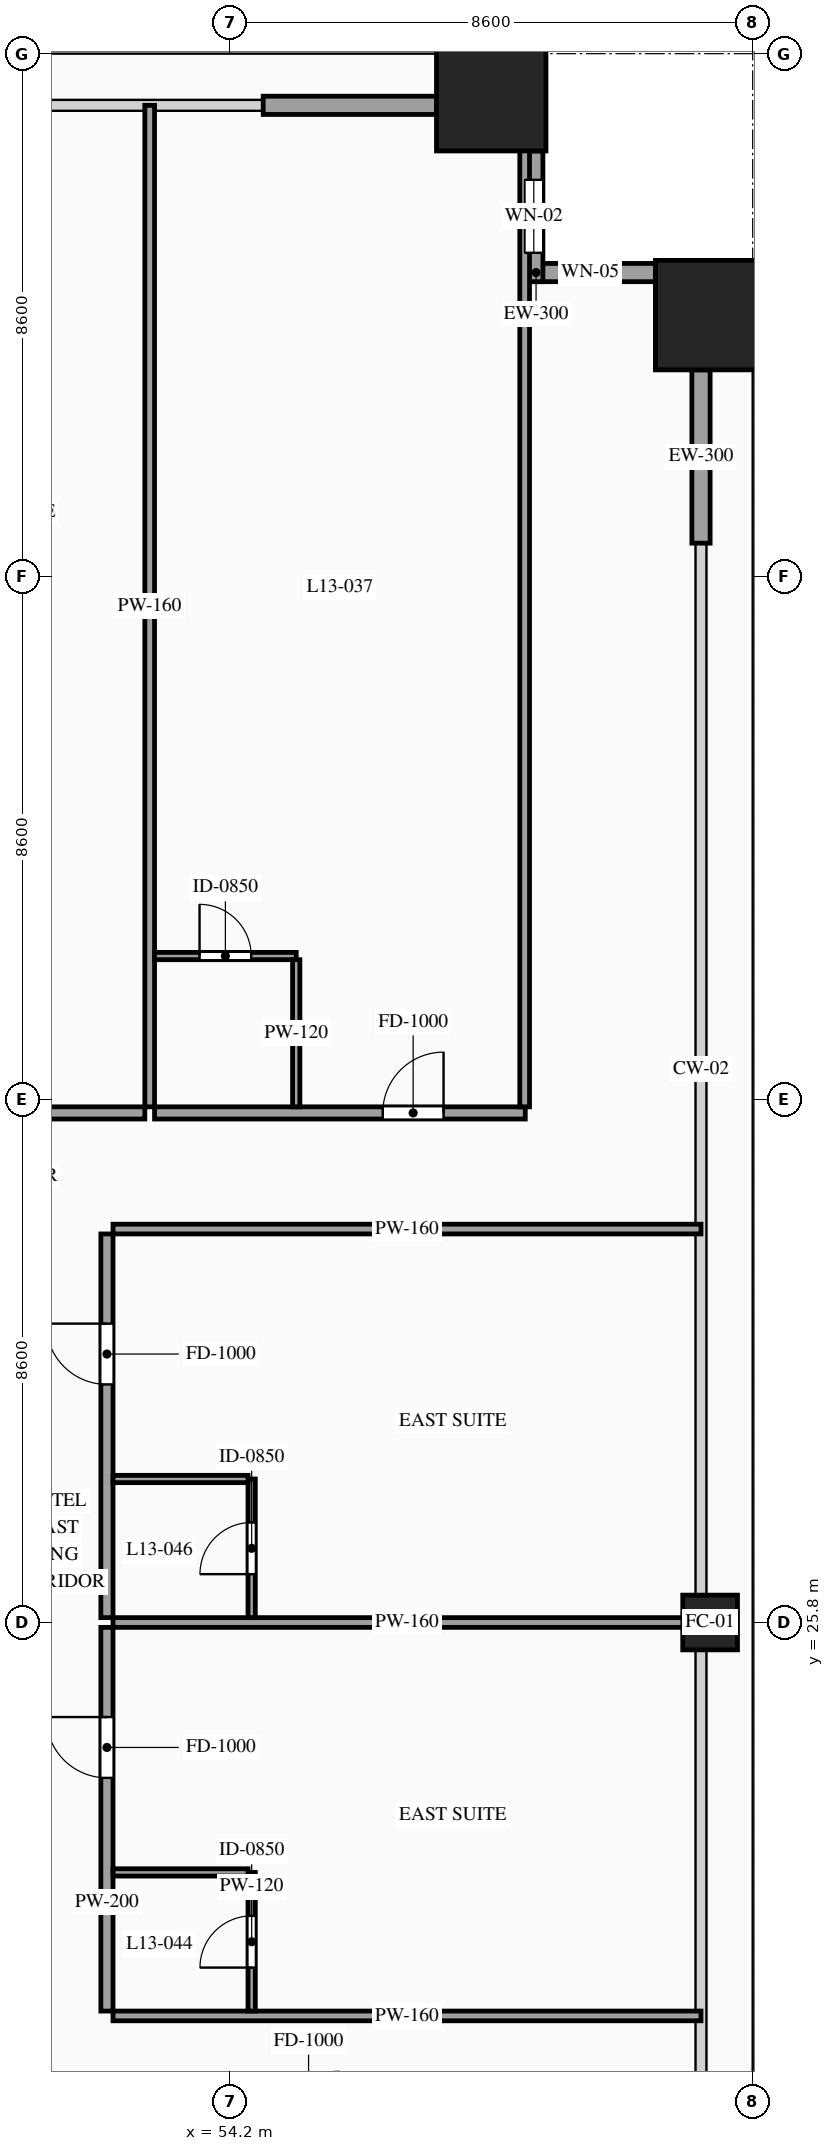
"""IFC4 building model, lengths in metres.
Left out: names, types, materials, properties, quantities, classifications, styles, units other than length and angle.
Written with IfcOpenShell. Run it as: python <this file> out.ifc"""

import sys

from ifc_helpers import new_model, si_unit, direction, frame, frame_2d, origin, origin_2d, place, context, subcontext, project, spatial, rectangle, hollow_rectangle, extrude, source, transform, mapped, element, fill, save


model = new_model("IFC4")
c1 = context("Model", 3, precision=1e-05, world=origin(), true_north=direction((0.0, 1.0)))
c2 = subcontext(c1, "Body", "Model", "MODEL_VIEW")
j1 = project(units=[si_unit("LENGTHUNIT", "METRE"), si_unit("PLANEANGLEUNIT", "RADIAN")], contexts=[c1])
p1 = place(None, origin())
s1 = spatial("IfcSite", under=j1, at=p1, CompositionType="ELEMENT")
p2 = place(p1, origin())
s2 = spatial("IfcBuilding", under=s1, at=p2, CompositionType="ELEMENT")
p3 = place(p2, frame((0.0, 0.0, 53.2)))
s3 = spatial("IfcBuildingStorey", under=s2, at=p3, CompositionType="ELEMENT", Elevation=53.2)
m1 = source(origin(), c2, "Body", "SweptSolid", [
    extrude(hollow_rectangle(XDim=1.8, YDim=1.8, WallThickness=0.08, at=origin_2d()), origin(), (0.0, 0.0, 1.0), 3.6),
])
p4 = place(p3, frame((58.5, 50.9, 0.0), z_axis=(0.0, 0.0, 1.0), x_axis=(1.0, 0.0, 0.0)))
e1 = element("IfcColumn", 1, at=p4, inside=s3, PredefinedType="COLUMN", context=c2, shape_type="MappedRepresentation", body=[
    mapped(m1, transform((0.0, 0.0, 0.0), scale=1.0)),
])
m2 = source(origin(), c2, "Body", "SweptSolid", [
    extrude(hollow_rectangle(XDim=0.9, YDim=0.9, WallThickness=0.042, at=origin_2d()), origin(), (0.0, 0.0, 1.0), 3.6),
])
p5 = place(p3, frame((62.1, 25.8, 0.0), z_axis=(0.0, 0.0, 1.0), x_axis=(1.0, 0.0, 0.0)))
e2 = element("IfcColumn", 2, at=p5, inside=s3, PredefinedType="COLUMN", context=c2, shape_type="MappedRepresentation", body=[
    mapped(m2, transform((0.0, 0.0, 0.0), scale=1.0)),
])
p6 = place(p3, frame((62.1, 47.3, 0.0), z_axis=(0.0, 0.0, 1.0), x_axis=(1.0, 0.0, 0.0)))
e3 = element("IfcColumn", 3, at=p6, inside=s3, PredefinedType="COLUMN", context=c2, shape_type="MappedRepresentation", body=[
    mapped(m1, transform((0.0, 0.0, 0.0), scale=1.0)),
])
p7 = place(p3, frame((61.2, 48.0, 0.0), z_axis=(0.0, 0.0, 1.0), x_axis=(-1.0, 0.0, 0.0)))
e4 = element("IfcWall", 4, at=p7, inside=s3, PredefinedType="SOLIDWALL", context=c2, shape_type="SweptSolid", body=[
    extrude(rectangle(XDim=2.15, YDim=0.3, at=frame_2d((1.075, 0.0))), origin(), (0.0, 0.0, 1.0), 3.38),
])
p8 = place(p7, frame((0.625, 0.0, 0.85)))
e5 = element("IfcOpeningElement", 5, at=p8, cuts=e4, PredefinedType="OPENING", context=c2, shape_type="SweptSolid", body=[
    extrude(rectangle(XDim=0.9, YDim=1.5, at=frame_2d((0.45, 0.75))), frame((0.0, 0.165, 0.0), z_axis=(0.0, -1.0, 0.0), x_axis=(1.0, 0.0, 0.0)), (0.0, 0.0, 1.0), 0.33),
])
p9 = place(p3, frame((59.2, 47.85, 0.0), z_axis=(0.0, 0.0, 1.0), x_axis=(0.0, 1.0, 0.0)))
e6 = element("IfcWall", 6, at=p9, inside=s3, PredefinedType="SOLIDWALL", context=c2, shape_type="SweptSolid", body=[
    extrude(rectangle(XDim=2.15, YDim=0.3, at=frame_2d((1.075, 0.0))), origin(), (0.0, 0.0, 1.0), 3.38),
])
p10 = place(p9, frame((0.475, 0.0, 0.85)))
e7 = element("IfcOpeningElement", 7, at=p10, cuts=e6, PredefinedType="OPENING", context=c2, shape_type="SweptSolid", body=[
    extrude(rectangle(XDim=1.2, YDim=2.1, at=frame_2d((0.6, 1.05))), frame((0.0, 0.165, 0.0), z_axis=(0.0, -1.0, 0.0), x_axis=(1.0, 0.0, 0.0)), (0.0, 0.0, 1.0), 0.33),
])
m3 = source(origin(), c2, "Body", "SweptSolid", [
    extrude(rectangle(XDim=2.85, YDim=0.3, at=frame_2d((1.425, 0.0))), origin(), (0.0, 0.0, 1.0), 2.775),
])
p11 = place(p3, frame((54.75, 50.75, 0.0), z_axis=(0.0, 0.0, 1.0), x_axis=(1.0, 0.0, 0.0)))
e8 = element("IfcWall", 8, at=p11, inside=s3, PredefinedType="SOLIDWALL", context=c2, shape_type="MappedRepresentation", body=[
    mapped(m3, transform((0.0, 0.0, 0.0), scale=1.0)),
])
m4 = source(origin(), c2, "Body", "SweptSolid", [
    extrude(rectangle(XDim=2.85, YDim=0.3, at=frame_2d((1.425, 0.0))), origin(), (0.0, 0.0, 1.0), 2.775),
])
p12 = place(p3, frame((61.95, 43.55, 0.0), z_axis=(0.0, 0.0, 1.0), x_axis=(0.0, 1.0, 0.0)))
e9 = element("IfcWall", 9, at=p12, inside=s3, PredefinedType="SOLIDWALL", context=c2, shape_type="MappedRepresentation", body=[
    mapped(m4, transform((0.0, 0.0, 0.0), scale=1.0)),
])
p13 = place(p3, frame((45.211, 34.18, 0.0), z_axis=(0.0, 0.0, 1.0), x_axis=(1.0, 0.0, 0.0)))
e10 = element("IfcWall", 10, at=p13, inside=s3, PredefinedType="PARTITIONING", context=c2, shape_type="SweptSolid", body=[
    extrude(rectangle(XDim=7.592, YDim=0.2, at=frame_2d((3.796, 0.0))), origin(), (0.0, 0.0, 1.0), 3.38),
])
p14 = place(p13, frame((4.501, 0.0, 0.0)))
e11 = element("IfcOpeningElement", 11, at=p14, cuts=e10, PredefinedType="OPENING", context=c2, shape_type="SweptSolid", body=[
    extrude(rectangle(XDim=1.0, YDim=2.2, at=frame_2d((0.5, 1.1))), frame((0.0, 0.115, 0.0), z_axis=(0.0, -1.0, 0.0), x_axis=(1.0, 0.0, 0.0)), (0.0, 0.0, 1.0), 0.23),
])
m5 = source(origin(), c2, "Body", "SweptSolid", [
    extrude(rectangle(XDim=16.47, YDim=0.16, at=frame_2d((8.235, 0.0))), origin(), (0.0, 0.0, 1.0), 3.38),
])
p15 = place(p3, frame((52.883, 34.28, 0.0), z_axis=(0.0, 0.0, 1.0), x_axis=(0.0, 1.0, 0.0)))
e12 = element("IfcWall", 12, at=p15, inside=s3, PredefinedType="PARTITIONING", context=c2, shape_type="MappedRepresentation", body=[
    mapped(m5, transform((0.0, 0.0, 0.0), scale=1.0)),
])
p16 = place(p3, frame((52.963, 34.18, 0.0), z_axis=(0.0, 0.0, 1.0), x_axis=(1.0, 0.0, 0.0)))
e13 = element("IfcWall", 13, at=p16, inside=s3, PredefinedType="PARTITIONING", context=c2, shape_type="SweptSolid", body=[
    extrude(rectangle(XDim=6.097, YDim=0.2, at=frame_2d((3.049, 0.0))), origin(), (0.0, 0.0, 1.0), 3.38),
])
p17 = place(p16, frame((3.753, 0.0, 0.0)))
e14 = element("IfcOpeningElement", 14, at=p17, cuts=e13, PredefinedType="OPENING", context=c2, shape_type="SweptSolid", body=[
    extrude(rectangle(XDim=1.0, YDim=2.2, at=frame_2d((0.5, 1.1))), frame((0.0, 0.115, 0.0), z_axis=(0.0, -1.0, 0.0), x_axis=(1.0, 0.0, 0.0)), (0.0, 0.0, 1.0), 0.23),
])
m6 = source(origin(), c2, "Body", "SweptSolid", [
    extrude(rectangle(XDim=16.32, YDim=0.16, at=frame_2d((8.16, 0.0))), origin(), (0.0, 0.0, 1.0), 3.38),
])
p18 = place(p3, frame((59.05, 34.28, 0.0), z_axis=(0.0, 0.0, 1.0), x_axis=(0.0, 1.0, 0.0)))
e15 = element("IfcWall", 15, at=p18, inside=s3, PredefinedType="PARTITIONING", context=c2, shape_type="MappedRepresentation", body=[
    mapped(m6, transform((0.0, 0.0, 0.0), scale=1.0)),
])
p19 = place(p3, frame((52.963, 36.76, 0.0), z_axis=(0.0, 0.0, 1.0), x_axis=(1.0, 0.0, 0.0)))
e16 = element("IfcWall", 16, at=p19, inside=s3, PredefinedType="PARTITIONING", context=c2, shape_type="SweptSolid", body=[
    extrude(rectangle(XDim=2.33, YDim=0.12, at=frame_2d((1.165, 0.0))), origin(), (0.0, 0.0, 1.0), 3.38),
])
p20 = place(p19, frame((0.74, 0.0, 0.0)))
e17 = element("IfcOpeningElement", 17, at=p20, cuts=e16, PredefinedType="OPENING", context=c2, shape_type="SweptSolid", body=[
    extrude(rectangle(XDim=0.85, YDim=2.1, at=frame_2d((0.425, 1.05))), frame((0.0, 0.075, 0.0), z_axis=(0.0, -1.0, 0.0), x_axis=(1.0, 0.0, 0.0)), (0.0, 0.0, 1.0), 0.15),
])
m7 = source(origin(), c2, "Body", "SweptSolid", [
    extrude(rectangle(XDim=2.42, YDim=0.12, at=frame_2d((1.21, 0.0))), origin(), (0.0, 0.0, 1.0), 3.38),
])
p21 = place(p3, frame((55.293, 34.28, 0.0), z_axis=(0.0, 0.0, 1.0), x_axis=(0.0, 1.0, 0.0)))
e18 = element("IfcWall", 18, at=p21, inside=s3, PredefinedType="PARTITIONING", context=c2, shape_type="MappedRepresentation", body=[
    mapped(m7, transform((0.0, 0.0, 0.0), scale=1.0)),
])
p22 = place(p3, frame((52.18, 19.41, 0.0), z_axis=(0.0, 0.0, 1.0), x_axis=(0.0, 1.0, 0.0)))
e19 = element("IfcWall", 19, at=p22, inside=s3, PredefinedType="PARTITIONING", context=c2, shape_type="SweptSolid", body=[
    extrude(rectangle(XDim=6.31, YDim=0.2, at=frame_2d((3.155, 0.0))), origin(), (0.0, 0.0, 1.0), 3.38),
])
p23 = place(p22, frame((3.835, 0.0, 0.0)))
e20 = element("IfcOpeningElement", 20, at=p23, cuts=e19, PredefinedType="OPENING", context=c2, shape_type="SweptSolid", body=[
    extrude(rectangle(XDim=1.0, YDim=2.2, at=frame_2d((0.5, 1.1))), frame((0.0, 0.115, 0.0), z_axis=(0.0, -1.0, 0.0), x_axis=(1.0, 0.0, 0.0)), (0.0, 0.0, 1.0), 0.23),
])
m8 = source(origin(), c2, "Body", "SweptSolid", [
    extrude(rectangle(XDim=9.67, YDim=0.16, at=frame_2d((4.835, 0.0))), origin(), (0.0, 0.0, 1.0), 2.575),
])
p24 = place(p3, frame((52.28, 25.8, 0.0), z_axis=(0.0, 0.0, 1.0), x_axis=(1.0, 0.0, 0.0)))
e21 = element("IfcWall", 21, at=p24, inside=s3, PredefinedType="PARTITIONING", context=c2, shape_type="MappedRepresentation", body=[
    mapped(m8, transform((0.0, 0.0, 0.0), scale=1.0)),
])
m9 = source(origin(), c2, "Body", "SweptSolid", [
    extrude(rectangle(XDim=9.67, YDim=0.16, at=frame_2d((4.835, 0.0))), origin(), (0.0, 0.0, 1.0), 2.875),
])
p25 = place(p3, frame((52.28, 19.33, 0.0), z_axis=(0.0, 0.0, 1.0), x_axis=(1.0, 0.0, 0.0)))
e22 = element("IfcWall", 22, at=p25, inside=s3, PredefinedType="PARTITIONING", context=c2, shape_type="MappedRepresentation", body=[
    mapped(m9, transform((0.0, 0.0, 0.0), scale=1.0)),
])
p26 = place(p3, frame((54.56, 19.41, 0.0), z_axis=(0.0, 0.0, 1.0), x_axis=(0.0, 1.0, 0.0)))
e23 = element("IfcWall", 23, at=p26, inside=s3, PredefinedType="PARTITIONING", context=c2, shape_type="SweptSolid", body=[
    extrude(rectangle(XDim=2.28, YDim=0.12, at=frame_2d((1.14, 0.0))), origin(), (0.0, 0.0, 1.0), 3.38),
])
p27 = place(p26, frame((0.715, 0.0, 0.0)))
e24 = element("IfcOpeningElement", 24, at=p27, cuts=e23, PredefinedType="OPENING", context=c2, shape_type="SweptSolid", body=[
    extrude(rectangle(XDim=0.85, YDim=2.1, at=frame_2d((0.425, 1.05))), frame((0.0, 0.075, 0.0), z_axis=(0.0, -1.0, 0.0), x_axis=(1.0, 0.0, 0.0)), (0.0, 0.0, 1.0), 0.15),
])
m10 = source(origin(), c2, "Body", "SweptSolid", [
    extrude(rectangle(XDim=2.22, YDim=0.12, at=frame_2d((1.11, 0.0))), origin(), (0.0, 0.0, 1.0), 3.38),
])
p28 = place(p3, frame((52.28, 21.69, 0.0), z_axis=(0.0, 0.0, 1.0), x_axis=(1.0, 0.0, 0.0)))
e25 = element("IfcWall", 25, at=p28, inside=s3, PredefinedType="PARTITIONING", context=c2, shape_type="MappedRepresentation", body=[
    mapped(m10, transform((0.0, 0.0, 0.0), scale=1.0)),
])
p29 = place(p3, frame((52.18, 25.88, 0.0), z_axis=(0.0, 0.0, 1.0), x_axis=(0.0, 1.0, 0.0)))
e26 = element("IfcWall", 26, at=p29, inside=s3, PredefinedType="PARTITIONING", context=c2, shape_type="SweptSolid", body=[
    extrude(rectangle(XDim=6.31, YDim=0.2, at=frame_2d((3.155, 0.0))), origin(), (0.0, 0.0, 1.0), 3.38),
])
p30 = place(p29, frame((3.835, 0.0, 0.0)))
e27 = element("IfcOpeningElement", 27, at=p30, cuts=e26, PredefinedType="OPENING", context=c2, shape_type="SweptSolid", body=[
    extrude(rectangle(XDim=1.0, YDim=2.2, at=frame_2d((0.5, 1.1))), frame((0.0, 0.115, 0.0), z_axis=(0.0, -1.0, 0.0), x_axis=(1.0, 0.0, 0.0)), (0.0, 0.0, 1.0), 0.23),
])
p31 = place(p3, frame((52.28, 32.27, 0.0), z_axis=(0.0, 0.0, 1.0), x_axis=(1.0, 0.0, 0.0)))
e28 = element("IfcWall", 28, at=p31, inside=s3, PredefinedType="PARTITIONING", context=c2, shape_type="MappedRepresentation", body=[
    mapped(m9, transform((0.0, 0.0, 0.0), scale=1.0)),
])
p32 = place(p3, frame((54.56, 25.88, 0.0), z_axis=(0.0, 0.0, 1.0), x_axis=(0.0, 1.0, 0.0)))
e29 = element("IfcWall", 29, at=p32, inside=s3, PredefinedType="PARTITIONING", context=c2, shape_type="SweptSolid", body=[
    extrude(rectangle(XDim=2.28, YDim=0.12, at=frame_2d((1.14, 0.0))), origin(), (0.0, 0.0, 1.0), 3.38),
])
p33 = place(p32, frame((0.715, 0.0, 0.0)))
e30 = element("IfcOpeningElement", 30, at=p33, cuts=e29, PredefinedType="OPENING", context=c2, shape_type="SweptSolid", body=[
    extrude(rectangle(XDim=0.85, YDim=2.1, at=frame_2d((0.425, 1.05))), frame((0.0, 0.075, 0.0), z_axis=(0.0, -1.0, 0.0), x_axis=(1.0, 0.0, 0.0)), (0.0, 0.0, 1.0), 0.15),
])
p34 = place(p3, frame((52.28, 28.16, 0.0), z_axis=(0.0, 0.0, 1.0), x_axis=(1.0, 0.0, 0.0)))
e31 = element("IfcWall", 31, at=p34, inside=s3, PredefinedType="PARTITIONING", context=c2, shape_type="MappedRepresentation", body=[
    mapped(m10, transform((0.0, 0.0, 0.0), scale=1.0)),
])
m11 = source(origin(), c2, "Body", "SweptSolid", [
    extrude(rectangle(XDim=0.9, YDim=1.5, at=frame_2d((0.45, 0.75))), frame((0.0, 0.03, 0.0), z_axis=(0.0, -1.0, 0.0), x_axis=(1.0, 0.0, 0.0)), (0.0, 0.0, 1.0), 0.06),
])
p35 = place(p8, origin())
e32 = element("IfcWindow", 32, at=p35, inside=s3, PartitioningType="SINGLE_PANEL", PredefinedType="WINDOW", context=c2, shape_type="MappedRepresentation", body=[
    mapped(m11, transform((0.0, 0.0, 0.0), scale=1.0)),
])
fill(e5, e32)
m12 = source(origin(), c2, "Body", "SweptSolid", [
    extrude(rectangle(XDim=1.2, YDim=2.1, at=frame_2d((0.6, 1.05))), frame((0.0, 0.03, 0.0), z_axis=(0.0, -1.0, 0.0), x_axis=(1.0, 0.0, 0.0)), (0.0, 0.0, 1.0), 0.06),
])
p36 = place(p10, origin())
e33 = element("IfcWindow", 33, at=p36, inside=s3, PartitioningType="SINGLE_PANEL", PredefinedType="WINDOW", context=c2, shape_type="MappedRepresentation", body=[
    mapped(m12, transform((0.0, 0.0, 0.0), scale=1.0)),
])
fill(e7, e33)
m13 = source(origin(), c2, "Body", "SweptSolid", [
    extrude(rectangle(XDim=1.0, YDim=2.2, at=frame_2d((0.5, 1.1))), frame((0.0, 0.025, 0.0), z_axis=(0.0, -1.0, 0.0), x_axis=(1.0, 0.0, 0.0)), (0.0, 0.0, 1.0), 0.05),
])
p37 = place(p17, origin())
e34 = element("IfcDoor", 34, at=p37, inside=s3, OperationType="SINGLE_SWING_RIGHT", PredefinedType="DOOR", context=c2, shape_type="MappedRepresentation", body=[
    mapped(m13, transform((0.0, 0.0, 0.0), scale=1.0)),
])
fill(e14, e34)
m14 = source(origin(), c2, "Body", "SweptSolid", [
    extrude(rectangle(XDim=0.85, YDim=2.1, at=frame_2d((0.425, 1.05))), frame((0.0, 0.025, 0.0), z_axis=(0.0, -1.0, 0.0), x_axis=(1.0, 0.0, 0.0)), (0.0, 0.0, 1.0), 0.05),
])
p38 = place(p20, origin())
e35 = element("IfcDoor", 35, at=p38, inside=s3, OperationType="SINGLE_SWING_LEFT", PredefinedType="DOOR", context=c2, shape_type="MappedRepresentation", body=[
    mapped(m14, transform((0.0, 0.0, 0.0), scale=1.0)),
])
fill(e17, e35)
p39 = place(p23, origin())
e36 = element("IfcDoor", 36, at=p39, inside=s3, OperationType="SINGLE_SWING_RIGHT", PredefinedType="DOOR", context=c2, shape_type="MappedRepresentation", body=[
    mapped(m13, transform((0.0, 0.0, 0.0), scale=1.0)),
])
fill(e20, e36)
p40 = place(p27, origin())
e37 = element("IfcDoor", 37, at=p40, inside=s3, OperationType="SINGLE_SWING_LEFT", PredefinedType="DOOR", context=c2, shape_type="MappedRepresentation", body=[
    mapped(m14, transform((0.0, 0.0, 0.0), scale=1.0)),
])
fill(e24, e37)
p41 = place(p30, origin())
e38 = element("IfcDoor", 38, at=p41, inside=s3, OperationType="SINGLE_SWING_RIGHT", PredefinedType="DOOR", context=c2, shape_type="MappedRepresentation", body=[
    mapped(m13, transform((0.0, 0.0, 0.0), scale=1.0)),
])
fill(e27, e38)
p42 = place(p33, origin())
e39 = element("IfcDoor", 39, at=p42, inside=s3, OperationType="SINGLE_SWING_LEFT", PredefinedType="DOOR", context=c2, shape_type="MappedRepresentation", body=[
    mapped(m14, transform((0.0, 0.0, 0.0), scale=1.0)),
])
fill(e30, e39)
save(model, sys.argv[1])
